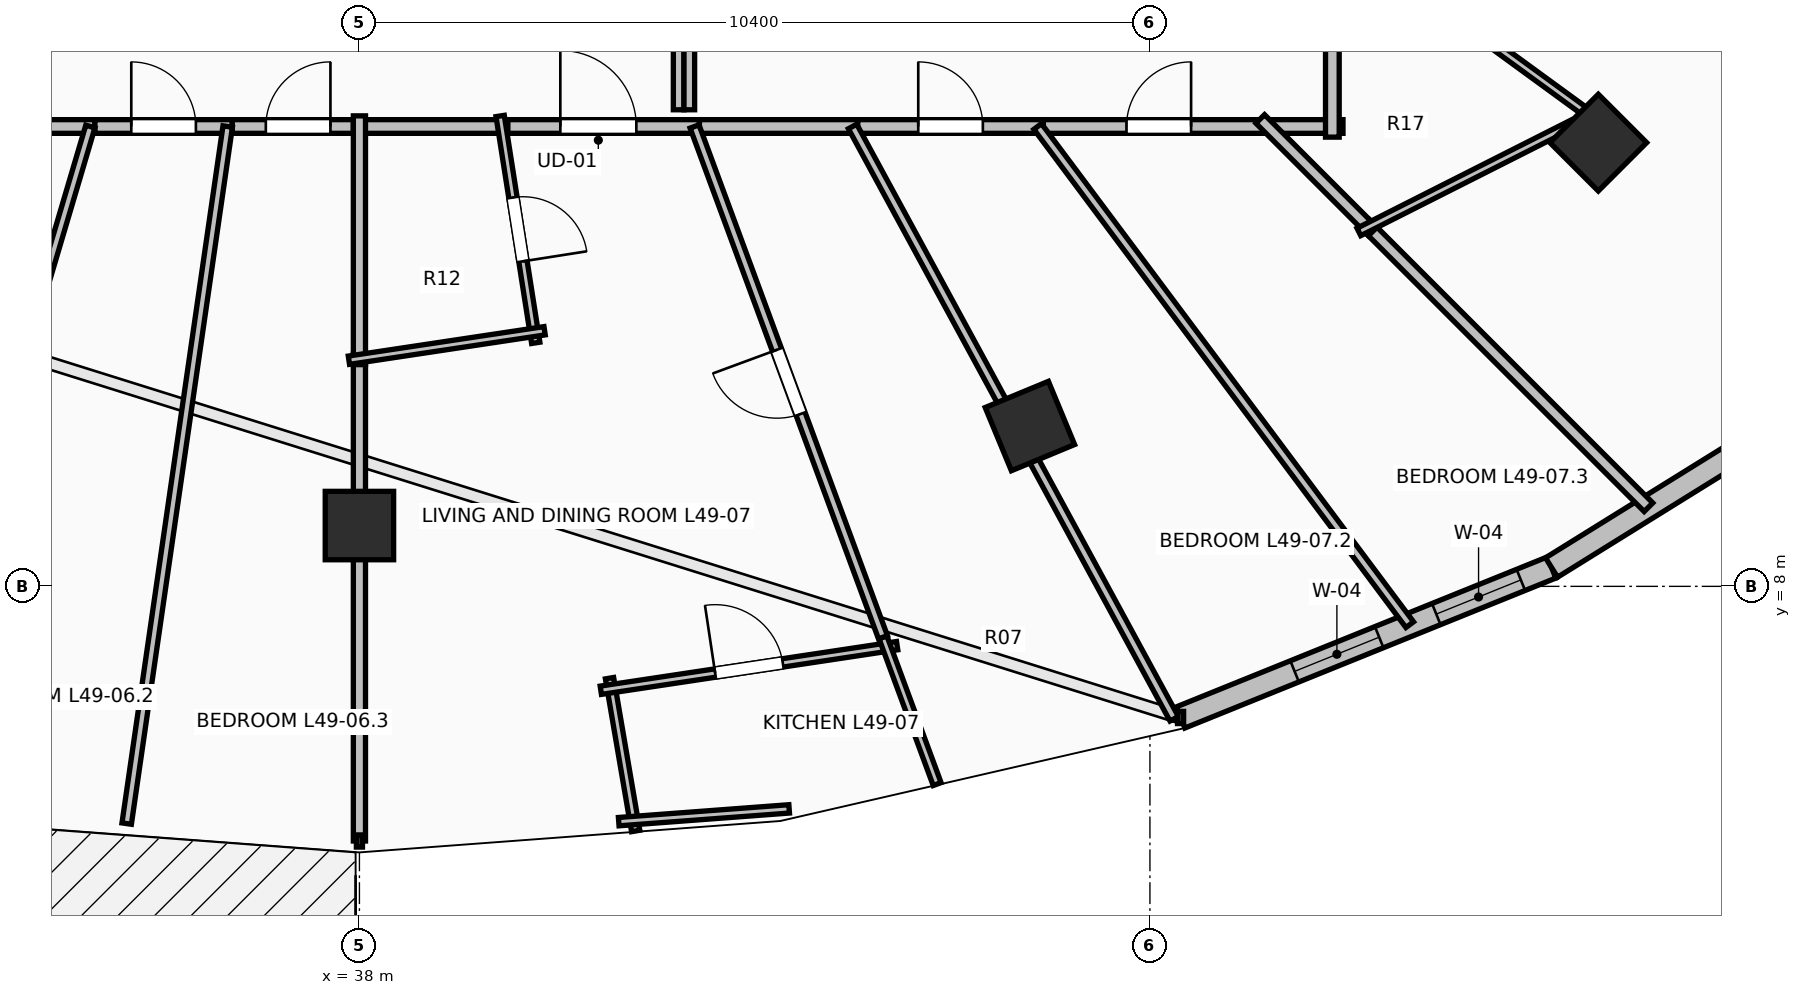
"""IFC4 building model, lengths in metres.
Left out: names, types, materials, properties, quantities, classifications, styles, units other than length and angle.
Written with IfcOpenShell. Run it as: python <this file> out.ifc"""

import sys

from ifc_helpers import new_model, si_unit, direction, frame, frame_2d, origin, origin_2d, place, context, subcontext, project, spatial, rectangle, extrude, element, fill, save


model = new_model("IFC4")
c1 = context("Model", 3, precision=1e-05, world=origin(), true_north=direction((0.0, 1.0)))
c2 = subcontext(c1, "Body", "Model", "MODEL_VIEW")
j1 = project(units=[si_unit("LENGTHUNIT", "METRE"), si_unit("PLANEANGLEUNIT", "RADIAN")], contexts=[c1])
p1 = place(None, origin())
s1 = spatial("IfcSite", under=j1, at=p1, CompositionType="ELEMENT")
p2 = place(p1, origin())
s2 = spatial("IfcBuilding", under=s1, at=p2, CompositionType="ELEMENT")
p3 = place(p2, frame((0.0, 0.0, 182.6)))
s3 = spatial("IfcBuildingStorey", under=s2, at=p3, CompositionType="ELEMENT", Elevation=182.6)
for number, where, z_axis, x_axis in (
    (1, (38.0, 8.8, 0.0), (0.0, 0.0, 1.0), (0.0, -1.0, 0.0)),
    (2, (46.821, 10.109, 0.0), (0.0, 0.0, 1.0), (0.383, -0.924, 0.0)),
    (3, (54.299, 13.838, 0.0), (0.0, 0.0, 1.0), (0.707, -0.707, 0.0)),
):
    element("IfcColumn", number, at=place(p3, frame(where, z_axis=z_axis, x_axis=x_axis)), inside=s3, PredefinedType="COLUMN", context=c2, shape_type="SweptSolid", body=[
        extrude(rectangle(XDim=0.9, YDim=0.9, at=origin_2d()), origin(), (0.0, 0.0, 1.0), 3.5),
    ])
p4 = place(p3, frame((48.803, 6.275, 0.0), z_axis=(0.0, 0.0, 1.0), x_axis=(0.927111094334, 0.374786630981, 0.0)))
e4 = element("IfcWall", 4, at=p4, inside=s3, PredefinedType="STANDARD", context=c2, shape_type="SweptSolid", body=[
    extrude(rectangle(XDim=5.264, YDim=0.3, at=frame_2d((2.632, 0.0))), origin(), (0.0, 0.0, 1.0), 3.24),
])
p5 = place(p4, frame((1.618, 0.0, 0.85)))
e5 = element("IfcOpeningElement", 5, at=p5, cuts=e4, PredefinedType="OPENING", context=c2, shape_type="SweptSolid", body=[
    extrude(rectangle(XDim=1.2, YDim=1.95, at=frame_2d((0.6, 0.975))), frame((0.0, 0.165, 0.0), z_axis=(0.0, -1.0, 0.0), x_axis=(1.0, 0.0, 0.0)), (0.0, 0.0, 1.0), 0.33),
])
p6 = place(p4, frame((3.628, 0.0, 0.85)))
e6 = element("IfcOpeningElement", 6, at=p6, cuts=e4, PredefinedType="OPENING", context=c2, shape_type="SweptSolid", body=[
    extrude(rectangle(XDim=1.2, YDim=1.95, at=frame_2d((0.6, 0.975))), frame((0.0, 0.165, 0.0), z_axis=(0.0, -1.0, 0.0), x_axis=(1.0, 0.0, 0.0)), (0.0, 0.0, 1.0), 0.33),
])
p7 = place(p3, frame((53.684, 8.248, 0.0), z_axis=(0.0, 0.0, 1.0), x_axis=(0.849647657754, 0.527350791858, 0.0)))
e7 = element("IfcWall", 7, at=p7, inside=s3, PredefinedType="STANDARD", context=c2, shape_type="SweptSolid", body=[
    extrude(rectangle(XDim=5.035, YDim=0.3, at=frame_2d((2.518, 0.0))), origin(), (0.0, 0.0, 1.0), 3.24),
])
p8 = place(p3, frame((32.551, 14.05, 0.0), z_axis=(0.0, 0.0, 1.0), x_axis=(1.0, 0.0, 0.0)))
e8 = element("IfcWall", 8, at=p8, inside=s3, PredefinedType="PARTITIONING", context=c2, shape_type="SweptSolid", body=[
    extrude(rectangle(XDim=1.969, YDim=0.18, at=frame_2d((0.984, 0.0))), origin(), (0.0, 0.0, 1.0), 3.24),
])
p9 = place(p3, frame((34.52, 14.05, 0.0), z_axis=(0.0, 0.0, 1.0), x_axis=(1.0, 0.0, 0.0)))
e9 = element("IfcWall", 9, at=p9, inside=s3, PredefinedType="PARTITIONING", context=c2, shape_type="SweptSolid", body=[
    extrude(rectangle(XDim=1.807, YDim=0.18, at=frame_2d((0.903, 0.0))), origin(), (0.0, 0.0, 1.0), 3.24),
])
p10 = place(p9, frame((0.479, 0.0, 0.0)))
e10 = element("IfcOpeningElement", 10, at=p10, cuts=e9, PredefinedType="OPENING", context=c2, shape_type="SweptSolid", body=[
    extrude(rectangle(XDim=0.85, YDim=2.1, at=frame_2d((0.425, 1.05))), frame((0.0, 0.105, 0.0), z_axis=(0.0, -1.0, 0.0), x_axis=(1.0, 0.0, 0.0)), (0.0, 0.0, 1.0), 0.21),
])
p11 = place(p3, frame((36.327, 14.05, 0.0), z_axis=(0.0, 0.0, 1.0), x_axis=(1.0, 0.0, 0.0)))
e11 = element("IfcWall", 11, at=p11, inside=s3, PredefinedType="PARTITIONING", context=c2, shape_type="SweptSolid", body=[
    extrude(rectangle(XDim=1.733, YDim=0.18, at=frame_2d((0.867, 0.0))), origin(), (0.0, 0.0, 1.0), 2.922),
])
p12 = place(p11, frame((0.441, 0.0, 0.0)))
e12 = element("IfcOpeningElement", 12, at=p12, cuts=e11, PredefinedType="OPENING", context=c2, shape_type="SweptSolid", body=[
    extrude(rectangle(XDim=0.85, YDim=2.1, at=frame_2d((0.425, 1.05))), frame((0.0, 0.105, 0.0), z_axis=(0.0, -1.0, 0.0), x_axis=(1.0, 0.0, 0.0)), (0.0, 0.0, 1.0), 0.21),
])
p13 = place(p3, frame((39.813, 14.05, 0.0), z_axis=(0.0, 0.0, 1.0), x_axis=(1.0, 0.0, 0.0)))
e13 = element("IfcWall", 13, at=p13, inside=s3, PredefinedType="PARTITIONING", context=c2, shape_type="SweptSolid", body=[
    extrude(rectangle(XDim=2.66, YDim=0.18, at=frame_2d((1.33, 0.0))), origin(), (0.0, 0.0, 1.0), 2.922),
])
p14 = place(p13, frame((0.83, 0.0, 0.0)))
e14 = element("IfcOpeningElement", 14, at=p14, cuts=e13, PredefinedType="OPENING", context=c2, shape_type="SweptSolid", body=[
    extrude(rectangle(XDim=1.0, YDim=2.15, at=frame_2d((0.5, 1.075))), frame((0.0, 0.105, 0.0), z_axis=(0.0, -1.0, 0.0), x_axis=(1.0, 0.0, 0.0)), (0.0, 0.0, 1.0), 0.21),
])
p15 = place(p3, frame((37.92, 14.05, 0.0), z_axis=(0.0, 0.0, 1.0), x_axis=(1.0, 0.0, 0.0)))
e15 = element("IfcWall", 15, at=p15, inside=s3, PredefinedType="PARTITIONING", context=c2, shape_type="SweptSolid", body=[
    extrude(rectangle(XDim=2.033, YDim=0.18, at=frame_2d((1.017, 0.0))), origin(), (0.0, 0.0, 1.0), 2.922),
])
p16 = place(p3, frame((42.473, 14.05, 0.0), z_axis=(0.0, 0.0, 1.0), x_axis=(1.0, 0.0, 0.0)))
e16 = element("IfcWall", 16, at=p16, inside=s3, PredefinedType="PARTITIONING", context=c2, shape_type="SweptSolid", body=[
    extrude(rectangle(XDim=2.083, YDim=0.18, at=frame_2d((1.042, 0.0))), origin(), (0.0, 0.0, 1.0), 2.922),
])
p17 = place(p3, frame((44.556, 14.05, 0.0), z_axis=(0.0, 0.0, 1.0), x_axis=(1.0, 0.0, 0.0)))
e17 = element("IfcWall", 17, at=p17, inside=s3, PredefinedType="PARTITIONING", context=c2, shape_type="SweptSolid", body=[
    extrude(rectangle(XDim=2.442, YDim=0.18, at=frame_2d((1.221, 0.0))), origin(), (0.0, 0.0, 1.0), 2.432),
])
p18 = place(p17, frame((0.796, 0.0, 0.0)))
e18 = element("IfcOpeningElement", 18, at=p18, cuts=e17, PredefinedType="OPENING", context=c2, shape_type="SweptSolid", body=[
    extrude(rectangle(XDim=0.85, YDim=2.1, at=frame_2d((0.425, 1.05))), frame((0.0, 0.105, 0.0), z_axis=(0.0, -1.0, 0.0), x_axis=(1.0, 0.0, 0.0)), (0.0, 0.0, 1.0), 0.21),
])
p19 = place(p3, frame((46.998, 14.05, 0.0), z_axis=(0.0, 0.0, 1.0), x_axis=(1.0, 0.0, 0.0)))
e19 = element("IfcWall", 19, at=p19, inside=s3, PredefinedType="PARTITIONING", context=c2, shape_type="SweptSolid", body=[
    extrude(rectangle(XDim=3.037, YDim=0.18, at=frame_2d((1.519, 0.0))), origin(), (0.0, 0.0, 1.0), 2.432),
])
p20 = place(p19, frame((1.094, 0.0, 0.0)))
e20 = element("IfcOpeningElement", 20, at=p20, cuts=e19, PredefinedType="OPENING", context=c2, shape_type="SweptSolid", body=[
    extrude(rectangle(XDim=0.85, YDim=2.1, at=frame_2d((0.425, 1.05))), frame((0.0, 0.105, 0.0), z_axis=(0.0, -1.0, 0.0), x_axis=(1.0, 0.0, 0.0)), (0.0, 0.0, 1.0), 0.21),
])
p21 = place(p3, frame((49.895, 14.05, 0.0), z_axis=(0.0, 0.0, 1.0), x_axis=(1.0, 0.0, 0.0)))
e21 = element("IfcWall", 21, at=p21, inside=s3, PredefinedType="PARTITIONING", context=c2, shape_type="SweptSolid", body=[
    extrude(rectangle(XDim=1.045, YDim=0.18, at=frame_2d((0.522, 0.0))), origin(), (0.0, 0.0, 1.0), 2.874),
])
p22 = place(p3, frame((50.8, 13.91, 0.0), z_axis=(0.0, 0.0, 1.0), x_axis=(0.0, 1.0, 0.0)))
e22 = element("IfcWall", 22, at=p22, inside=s3, PredefinedType="PARTITIONING", context=c2, shape_type="SweptSolid", body=[
    extrude(rectangle(XDim=2.826, YDim=0.18, at=frame_2d((1.413, 0.0))), origin(), (0.0, 0.0, 1.0), 2.432),
])
p23 = place(p3, frame((31.842, 5.21, 0.0), z_axis=(0.0, 0.0, 1.0), x_axis=(0.283952183478, 0.958838441813, 0.0)))
e23 = element("IfcWall", 23, at=p23, inside=s3, PredefinedType="PARTITIONING", context=c2, shape_type="SweptSolid", body=[
    extrude(rectangle(XDim=9.219, YDim=0.125, at=frame_2d((4.61, 0.0))), origin(), (0.0, 0.0, 1.0), 2.774),
])
p24 = place(p3, frame((34.938, 4.879, 0.0), z_axis=(0.0, 0.0, 1.0), x_axis=(0.143423836858, 0.989661357749, 0.0)))
e24 = element("IfcWall", 24, at=p24, inside=s3, PredefinedType="PARTITIONING", context=c2, shape_type="SweptSolid", body=[
    extrude(rectangle(XDim=9.267, YDim=0.125, at=frame_2d((4.633, 0.0))), origin(), (0.0, 0.0, 1.0), 2.774),
])
p25 = place(p3, frame((38.0, 4.65, 0.0), z_axis=(0.0, 0.0, 1.0), x_axis=(0.0, 1.0, 0.0)))
e25 = element("IfcWall", 25, at=p25, inside=s3, PredefinedType="PARTITIONING", context=c2, shape_type="SweptSolid", body=[
    extrude(rectangle(XDim=6.407, YDim=0.16, at=frame_2d((3.204, 0.0))), origin(), (0.0, 0.0, 1.0), 3.24),
])
p26 = place(p3, frame((38.0, 10.917, 0.0), z_axis=(0.0, 0.0, 1.0), x_axis=(0.0, 1.0, 0.0)))
e26 = element("IfcWall", 26, at=p26, inside=s3, PredefinedType="PARTITIONING", context=c2, shape_type="SweptSolid", body=[
    extrude(rectangle(XDim=3.273, YDim=0.16, at=frame_2d((1.636, 0.0))), origin(), (0.0, 0.0, 1.0), 2.874),
])
p27 = place(p3, frame((39.851, 14.188, 0.0), z_axis=(0.0, 0.0, 1.0), x_axis=(0.154995605388, -0.98791515947, 0.0)))
e27 = element("IfcWall", 27, at=p27, inside=s3, PredefinedType="PARTITIONING", context=c2, shape_type="SweptSolid", body=[
    extrude(rectangle(XDim=3.021, YDim=0.11, at=frame_2d((1.511, 0.0))), origin(), (0.0, 0.0, 1.0), 2.874),
])
p28 = place(p27, frame((1.086, 0.0, 0.0)))
e28 = element("IfcOpeningElement", 28, at=p28, cuts=e27, PredefinedType="OPENING", context=c2, shape_type="SweptSolid", body=[
    extrude(rectangle(XDim=0.85, YDim=2.1, at=frame_2d((0.425, 1.05))), frame((0.0, 0.07, 0.0), z_axis=(0.0, -1.0, 0.0), x_axis=(1.0, 0.0, 0.0)), (0.0, 0.0, 1.0), 0.14),
])
p29 = place(p3, frame((40.436, 11.363, 0.0), z_axis=(0.0, 0.0, 1.0), x_axis=(-0.988852287037, -0.148899813371, 0.0)))
e29 = element("IfcWall", 29, at=p29, inside=s3, PredefinedType="PARTITIONING", context=c2, shape_type="SweptSolid", body=[
    extrude(rectangle(XDim=2.604, YDim=0.11, at=frame_2d((1.302, 0.0))), origin(), (0.0, 0.0, 1.0), 3.24),
])
p30 = place(p3, frame((41.635, 4.782, 0.0), z_axis=(0.0, 0.0, 1.0), x_axis=(-0.168804313657, 0.985649584635, 0.0)))
e30 = element("IfcWall", 30, at=p30, inside=s3, PredefinedType="PARTITIONING", context=c2, shape_type="SweptSolid", body=[
    extrude(rectangle(XDim=2.039, YDim=0.11, at=frame_2d((1.02, 0.0))), origin(), (0.0, 0.0, 1.0), 3.24),
])
p31 = place(p3, frame((41.176, 6.633, 0.0), z_axis=(0.0, 0.0, 1.0), x_axis=(0.988877230123, 0.148734070555, 0.0)))
e31 = element("IfcWall", 31, at=p31, inside=s3, PredefinedType="PARTITIONING", context=c2, shape_type="SweptSolid", body=[
    extrude(rectangle(XDim=3.943, YDim=0.11, at=frame_2d((1.971, 0.0))), origin(), (0.0, 0.0, 1.0), 3.24),
])
p32 = place(p31, frame((1.521, 0.0, 0.0)))
e32 = element("IfcOpeningElement", 32, at=p32, cuts=e31, PredefinedType="OPENING", context=c2, shape_type="SweptSolid", body=[
    extrude(rectangle(XDim=0.9, YDim=2.1, at=frame_2d((0.45, 1.05))), frame((0.0, 0.07, 0.0), z_axis=(0.0, -1.0, 0.0), x_axis=(1.0, 0.0, 0.0)), (0.0, 0.0, 1.0), 0.14),
])
p33 = place(p3, frame((44.887, 7.33, 0.0), z_axis=(0.0, 0.0, 1.0), x_axis=(0.346337161188, -0.938110105894, 0.0)))
e33 = element("IfcWall", 33, at=p33, inside=s3, PredefinedType="PARTITIONING", context=c2, shape_type="SweptSolid", body=[
    extrude(rectangle(XDim=2.059, YDim=0.11, at=frame_2d((1.03, 0.0))), origin(), (0.0, 0.0, 1.0), 3.24),
])
p34 = place(p3, frame((41.411, 4.905, 0.0), z_axis=(0.0, 0.0, 1.0), x_axis=(0.997205784552, 0.074703569226, 0.0)))
e34 = element("IfcWall", 34, at=p34, inside=s3, PredefinedType="PARTITIONING", context=c2, shape_type="SweptSolid", body=[
    extrude(rectangle(XDim=2.249, YDim=0.11, at=frame_2d((1.124, 0.0))), origin(), (0.0, 0.0, 1.0), 3.24),
])
p35 = place(p3, frame((44.888, 7.33, 0.0), z_axis=(0.0, 0.0, 1.0), x_axis=(-0.346082862485, 0.938203950266, 0.0)))
e35 = element("IfcWall", 35, at=p35, inside=s3, PredefinedType="PARTITIONING", context=c2, shape_type="SweptSolid", body=[
    extrude(rectangle(XDim=7.162, YDim=0.125, at=frame_2d((3.581, 0.0))), origin(), (0.0, 0.0, 1.0), 2.432),
])
p36 = place(p35, frame((3.131, 0.0, 0.0)))
e36 = element("IfcOpeningElement", 36, at=p36, cuts=e35, PredefinedType="OPENING", context=c2, shape_type="SweptSolid", body=[
    extrude(rectangle(XDim=0.9, YDim=2.1, at=frame_2d((0.45, 1.05))), frame((0.0, 0.077, 0.0), z_axis=(0.0, -1.0, 0.0), x_axis=(1.0, 0.0, 0.0)), (0.0, 0.0, 1.0), 0.155),
])
p37 = place(p3, frame((48.719, 6.258, 0.0), z_axis=(0.0, 0.0, 1.0), x_axis=(-0.477180576465, 0.878805267078, 0.0)))
e37 = element("IfcWall", 37, at=p37, inside=s3, PredefinedType="PARTITIONING", context=c2, shape_type="SweptSolid", body=[
    extrude(rectangle(XDim=8.866, YDim=0.125, at=frame_2d((4.433, 0.0))), origin(), (0.0, 0.0, 1.0), 2.432),
])
p38 = place(p3, frame((51.818, 7.496, 0.0), z_axis=(0.0, 0.0, 1.0), x_axis=(-0.598399090147, 0.801198183292, 0.0)))
e38 = element("IfcWall", 38, at=p38, inside=s3, PredefinedType="PARTITIONING", context=c2, shape_type="SweptSolid", body=[
    extrude(rectangle(XDim=8.18, YDim=0.125, at=frame_2d((4.09, 0.0))), origin(), (0.0, 0.0, 1.0), 2.432),
])
p39 = place(p3, frame((54.959, 9.041, 0.0), z_axis=(0.0, 0.0, 1.0), x_axis=(-0.707106781187, 0.707106781187, 0.0)))
e39 = element("IfcWall", 39, at=p39, inside=s3, PredefinedType="PARTITIONING", context=c2, shape_type="SweptSolid", body=[
    extrude(rectangle(XDim=5.271, YDim=0.16, at=frame_2d((2.635, 0.0))), origin(), (0.0, 0.0, 1.0), 2.774),
])
p40 = place(p3, frame((51.331, 12.669, 0.0), z_axis=(0.0, 0.0, 1.0), x_axis=(-0.707106781187, 0.707106781187, 0.0)))
e40 = element("IfcWall", 40, at=p40, inside=s3, PredefinedType="PARTITIONING", context=c2, shape_type="SweptSolid", body=[
    extrude(rectangle(XDim=2.093, YDim=0.16, at=frame_2d((1.046, 0.0))), origin(), (0.0, 0.0, 1.0), 2.874),
])
p41 = place(p3, frame((50.687, 16.752, 0.0), z_axis=(0.0, 0.0, 1.0), x_axis=(0.808074646764, -0.589080100883, 0.0)))
e41 = element("IfcWall", 41, at=p41, inside=s3, PredefinedType="PARTITIONING", context=c2, shape_type="SweptSolid", body=[
    extrude(rectangle(XDim=4.329, YDim=0.11, at=frame_2d((2.165, 0.0))), origin(), (0.0, 0.0, 1.0), 2.874),
])
p42 = place(p41, frame((1.74, 0.0, 0.0)))
e42 = element("IfcOpeningElement", 42, at=p42, cuts=e41, PredefinedType="OPENING", context=c2, shape_type="SweptSolid", body=[
    extrude(rectangle(XDim=0.85, YDim=2.1, at=frame_2d((0.425, 1.05))), frame((0.0, 0.07, 0.0), z_axis=(0.0, -1.0, 0.0), x_axis=(1.0, 0.0, 0.0)), (0.0, 0.0, 1.0), 0.14),
])
p43 = place(p3, frame((53.964, 14.085, 0.0), z_axis=(0.0, 0.0, 1.0), x_axis=(-0.892546166909, -0.450956028828, 0.0)))
e43 = element("IfcWall", 43, at=p43, inside=s3, PredefinedType="PARTITIONING", context=c2, shape_type="SweptSolid", body=[
    extrude(rectangle(XDim=3.154, YDim=0.11, at=frame_2d((1.577, 0.0))), origin(), (0.0, 0.0, 1.0), 2.432),
])
for number, where, z_axis, x_axis in (
    (44, (42.2, 16.1, 0.0), (0.0, 0.0, 1.0), (0.0, -1.0, 0.0)),
    (45, (42.34, 14.27, 0.0), (0.0, 0.0, 1.0), (0.0, 1.0, 0.0)),
):
    element("IfcWall", number, at=place(p3, frame(where, z_axis=z_axis, x_axis=x_axis)), inside=s3, PredefinedType="PARTITIONING", context=c2, shape_type="SweptSolid", body=[
        extrude(rectangle(XDim=1.83, YDim=0.14, at=frame_2d((0.915, 0.0))), origin(), (0.0, 0.0, 1.0), 2.922),
    ])
p44 = place(p5, origin())
e46 = element("IfcWindow", 46, at=p44, inside=s3, PartitioningType="SINGLE_PANEL", PredefinedType="WINDOW", context=c2, shape_type="SweptSolid", body=[
    extrude(rectangle(XDim=1.2, YDim=1.95, at=frame_2d((0.6, 0.975))), frame((0.0, 0.03, 0.0), z_axis=(0.0, -1.0, 0.0), x_axis=(1.0, 0.0, 0.0)), (0.0, 0.0, 1.0), 0.06),
])
fill(e5, e46)
p45 = place(p6, origin())
e47 = element("IfcWindow", 47, at=p45, inside=s3, PartitioningType="SINGLE_PANEL", PredefinedType="WINDOW", context=c2, shape_type="SweptSolid", body=[
    extrude(rectangle(XDim=1.2, YDim=1.95, at=frame_2d((0.6, 0.975))), frame((0.0, 0.03, 0.0), z_axis=(0.0, -1.0, 0.0), x_axis=(1.0, 0.0, 0.0)), (0.0, 0.0, 1.0), 0.06),
])
fill(e6, e47)
p46 = place(p14, origin())
e48 = element("IfcDoor", 48, at=p46, inside=s3, OperationType="SINGLE_SWING_LEFT", PredefinedType="DOOR", context=c2, shape_type="SweptSolid", body=[
    extrude(rectangle(XDim=1.0, YDim=2.15, at=frame_2d((0.5, 1.075))), frame((0.0, 0.025, 0.0), z_axis=(0.0, -1.0, 0.0), x_axis=(1.0, 0.0, 0.0)), (0.0, 0.0, 1.0), 0.05),
])
fill(e14, e48)
p47 = place(p28, origin())
e49 = element("IfcDoor", 49, at=p47, inside=s3, OperationType="SINGLE_SWING_RIGHT", PredefinedType="DOOR", context=c2, shape_type="SweptSolid", body=[
    extrude(rectangle(XDim=0.85, YDim=2.1, at=frame_2d((0.425, 1.05))), frame((0.0, 0.025, 0.0), z_axis=(0.0, -1.0, 0.0), x_axis=(1.0, 0.0, 0.0)), (0.0, 0.0, 1.0), 0.05),
])
fill(e28, e49)
p48 = place(p32, origin())
e50 = element("IfcDoor", 50, at=p48, inside=s3, OperationType="SINGLE_SWING_LEFT", PredefinedType="DOOR", context=c2, shape_type="SweptSolid", body=[
    extrude(rectangle(XDim=0.9, YDim=2.1, at=frame_2d((0.45, 1.05))), frame((0.0, 0.025, 0.0), z_axis=(0.0, -1.0, 0.0), x_axis=(1.0, 0.0, 0.0)), (0.0, 0.0, 1.0), 0.05),
])
fill(e32, e50)
p49 = place(p36, origin())
e51 = element("IfcDoor", 51, at=p49, inside=s3, OperationType="SINGLE_SWING_RIGHT", PredefinedType="DOOR", context=c2, shape_type="SweptSolid", body=[
    extrude(rectangle(XDim=0.9, YDim=2.1, at=frame_2d((0.45, 1.05))), frame((0.0, 0.025, 0.0), z_axis=(0.0, -1.0, 0.0), x_axis=(1.0, 0.0, 0.0)), (0.0, 0.0, 1.0), 0.05),
])
fill(e36, e51)
p50 = place(p10, origin())
e52 = element("IfcDoor", 52, at=p50, inside=s3, OperationType="SINGLE_SWING_LEFT", PredefinedType="DOOR", context=c2, shape_type="SweptSolid", body=[
    extrude(rectangle(XDim=0.85, YDim=2.1, at=frame_2d((0.425, 1.05))), frame((0.0, 0.025, 0.0), z_axis=(0.0, -1.0, 0.0), x_axis=(1.0, 0.0, 0.0)), (0.0, 0.0, 1.0), 0.05),
])
fill(e10, e52)
p51 = place(p12, origin())
e53 = element("IfcDoor", 53, at=p51, inside=s3, OperationType="SINGLE_SWING_RIGHT", PredefinedType="DOOR", context=c2, shape_type="SweptSolid", body=[
    extrude(rectangle(XDim=0.85, YDim=2.1, at=frame_2d((0.425, 1.05))), frame((0.0, 0.025, 0.0), z_axis=(0.0, -1.0, 0.0), x_axis=(1.0, 0.0, 0.0)), (0.0, 0.0, 1.0), 0.05),
])
fill(e12, e53)
p52 = place(p18, origin())
e54 = element("IfcDoor", 54, at=p52, inside=s3, OperationType="SINGLE_SWING_LEFT", PredefinedType="DOOR", context=c2, shape_type="SweptSolid", body=[
    extrude(rectangle(XDim=0.85, YDim=2.1, at=frame_2d((0.425, 1.05))), frame((0.0, 0.025, 0.0), z_axis=(0.0, -1.0, 0.0), x_axis=(1.0, 0.0, 0.0)), (0.0, 0.0, 1.0), 0.05),
])
fill(e18, e54)
p53 = place(p20, origin())
e55 = element("IfcDoor", 55, at=p53, inside=s3, OperationType="SINGLE_SWING_RIGHT", PredefinedType="DOOR", context=c2, shape_type="SweptSolid", body=[
    extrude(rectangle(XDim=0.85, YDim=2.1, at=frame_2d((0.425, 1.05))), frame((0.0, 0.025, 0.0), z_axis=(0.0, -1.0, 0.0), x_axis=(1.0, 0.0, 0.0)), (0.0, 0.0, 1.0), 0.05),
])
fill(e20, e55)
save(model, sys.argv[1])
